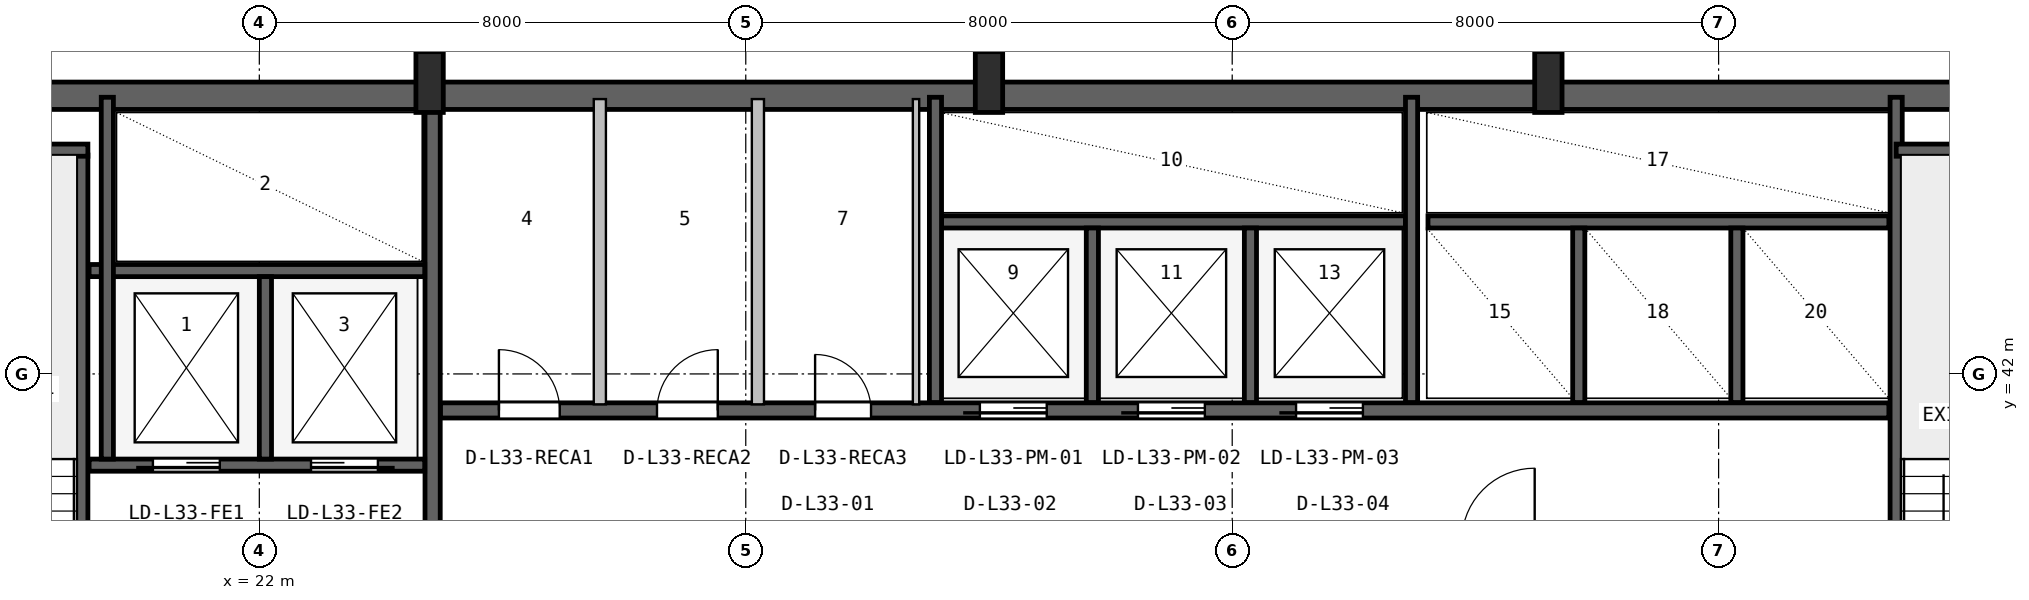
"""IFC4 building model, lengths in metres.
Left out: names, types, materials, properties, quantities, classifications, styles, units other than length and angle.
Written with IfcOpenShell. Run it as: python <this file> out.ifc"""

import sys

from ifc_helpers import new_model, si_unit, direction, frame, frame_2d, origin, origin_2d, place, context, subcontext, project, spatial, rectangle, i_section, extrude, source, transform, mapped, element, fill, save


model = new_model("IFC4")
c1 = context("Model", 3, precision=1e-05, world=origin(), true_north=direction((0.0, 1.0)))
c2 = subcontext(c1, "Body", "Model", "MODEL_VIEW")
j1 = project(units=[si_unit("LENGTHUNIT", "METRE"), si_unit("PLANEANGLEUNIT", "RADIAN")], contexts=[c1])
p1 = place(None, origin())
s1 = spatial("IfcSite", under=j1, at=p1, CompositionType="ELEMENT")
p2 = place(p1, origin())
s2 = spatial("IfcBuilding", under=s1, at=p2, CompositionType="ELEMENT")
p3 = place(p2, frame((0.0, 0.0, 137.2)))
s3 = spatial("IfcBuildingStorey", under=s2, at=p3, CompositionType="ELEMENT", Elevation=137.2)
p4 = place(p3, frame((15.6, 46.575, 0.0), z_axis=(0.0, 0.0, 1.0), x_axis=(1.0, 0.0, 0.0)))
e1 = element("IfcWall", 1, at=p4, inside=s3, PredefinedType="SHEAR", context=c2, shape_type="SweptSolid", body=[
    extrude(rectangle(XDim=36.8, YDim=0.45, at=frame_2d((18.4, 0.0))), origin(), (0.0, 0.0, 1.0), 3.48),
])
m1 = source(origin(), c2, "Body", "SweptSolid", [
    extrude(i_section(OverallWidth=0.45, OverallDepth=1.0, WebThickness=0.016, FlangeThickness=0.03, FilletRadius=0.016, at=origin_2d()), origin(), (0.0, 0.0, 1.0), 3.8),
])
for number, where, z_axis, x_axis in (
    (2, (24.8, 46.8, 0.0), (0.0, 0.0, 1.0), (1.0, 0.0, 0.0)),
    (3, (34.0, 46.8, 0.0), (0.0, 0.0, 1.0), (1.0, 0.0, 0.0)),
    (4, (43.2, 46.8, 0.0), (0.0, 0.0, 1.0), (1.0, 0.0, 0.0)),
):
    element("IfcColumn", number, at=place(p3, frame(where, z_axis=z_axis, x_axis=x_axis)), inside=s3, PredefinedType="COLUMN", context=c2, shape_type="MappedRepresentation", body=[
        mapped(m1, transform((0.0, 0.0, 0.0), x_axis=(1.0, 0.0, 0.0), y_axis=(0.0, 1.0, 0.0), z_axis=(0.0, 0.0, 1.0), scale=1.0)),
    ])
p5 = place(p3, frame((19.08, 35.95, 0.0), z_axis=(0.0, 0.0, 1.0), x_axis=(0.0, 1.0, 0.0)))
e5 = element("IfcWall", 5, at=p5, inside=s3, PredefinedType="SHEAR", context=c2, shape_type="SweptSolid", body=[
    extrude(rectangle(XDim=9.65, YDim=0.2, at=frame_2d((4.825, 0.0))), origin(), (0.0, 0.0, 1.0), 3.48),
])
p6 = place(p5, frame((0.25, 0.0, 0.0)))
e6 = element("IfcOpeningElement", 6, at=p6, cuts=e5, PredefinedType="OPENING", context=c2, shape_type="SweptSolid", body=[
    extrude(rectangle(XDim=0.95, YDim=2.1, at=frame_2d((0.475, 1.05))), frame((0.0, 0.11, 0.0), z_axis=(0.0, -1.0, 0.0), x_axis=(1.0, 0.0, 0.0)), (0.0, 0.0, 1.0), 0.22),
])
p7 = place(p3, frame((15.95, 45.68, 0.0), z_axis=(0.0, 0.0, 1.0), x_axis=(1.0, 0.0, 0.0)))
e7 = element("IfcWall", 7, at=p7, inside=s3, PredefinedType="SHEAR", context=c2, shape_type="SweptSolid", body=[
    extrude(rectangle(XDim=3.23, YDim=0.2, at=frame_2d((1.615, 0.0))), origin(), (0.0, 0.0, 1.0), 3.48),
])
p8 = place(p3, frame((24.85, 36.05, 0.0), z_axis=(0.0, 0.0, 1.0), x_axis=(0.0, 1.0, 0.0)))
e8 = element("IfcWall", 8, at=p8, inside=s3, PredefinedType="SHEAR", context=c2, shape_type="SweptSolid", body=[
    extrude(rectangle(XDim=10.45, YDim=0.25, at=frame_2d((5.225, 0.0))), origin(), (0.0, 0.0, 1.0), 3.48),
])
p9 = place(p3, frame((19.2, 40.5, 0.0), z_axis=(0.0, 0.0, 1.0), x_axis=(1.0, 0.0, 0.0)))
e9 = element("IfcWall", 9, at=p9, inside=s3, PredefinedType="SHEAR", context=c2, shape_type="SweptSolid", body=[
    extrude(rectangle(XDim=5.52, YDim=0.2, at=frame_2d((2.76, 0.0))), origin(), (0.0, 0.0, 1.0), 3.48),
])
p10 = place(p9, frame((1.05, 0.0, 0.0)))
e10 = element("IfcOpeningElement", 10, at=p10, cuts=e9, PredefinedType="OPENING", context=c2, shape_type="SweptSolid", body=[
    extrude(rectangle(XDim=1.1, YDim=2.18, at=frame_2d((0.55, 1.09))), frame((0.0, 0.11, 0.0), z_axis=(0.0, -1.0, 0.0), x_axis=(1.0, 0.0, 0.0)), (0.0, 0.0, 1.0), 0.22),
])
p11 = place(p9, frame((3.65, 0.0, 0.0)))
e11 = element("IfcOpeningElement", 11, at=p11, cuts=e9, PredefinedType="OPENING", context=c2, shape_type="SweptSolid", body=[
    extrude(rectangle(XDim=1.1, YDim=2.18, at=frame_2d((0.55, 1.09))), frame((0.0, 0.11, 0.0), z_axis=(0.0, -1.0, 0.0), x_axis=(1.0, 0.0, 0.0)), (0.0, 0.0, 1.0), 0.22),
])
p12 = place(p3, frame((19.2, 43.7, 0.0), z_axis=(0.0, 0.0, 1.0), x_axis=(1.0, 0.0, 0.0)))
e12 = element("IfcWall", 12, at=p12, inside=s3, PredefinedType="SHEAR", context=c2, shape_type="SweptSolid", body=[
    extrude(rectangle(XDim=5.52, YDim=0.2, at=frame_2d((2.76, 0.0))), origin(), (0.0, 0.0, 1.0), 3.48),
])
p13 = place(p3, frame((22.1, 40.6, 0.0), z_axis=(0.0, 0.0, 1.0), x_axis=(0.0, 1.0, 0.0)))
e13 = element("IfcWall", 13, at=p13, inside=s3, PredefinedType="SHEAR", context=c2, shape_type="SweptSolid", body=[
    extrude(rectangle(XDim=3.0, YDim=0.2, at=frame_2d((1.5, 0.0))), origin(), (0.0, 0.0, 1.0), 3.48),
])
p14 = place(p3, frame((19.5, 40.6, 0.0), z_axis=(0.0, 0.0, 1.0), x_axis=(0.0, 1.0, 0.0)))
e14 = element("IfcWall", 14, at=p14, inside=s3, PredefinedType="SHEAR", context=c2, shape_type="SweptSolid", body=[
    extrude(rectangle(XDim=5.95, YDim=0.2, at=frame_2d((2.975, 0.0))), origin(), (0.0, 0.0, 1.0), 3.48),
])
p15 = place(p3, frame((48.92, 36.05, 0.0), z_axis=(0.0, 0.0, 1.0), x_axis=(0.0, 1.0, 0.0)))
e15 = element("IfcWall", 15, at=p15, inside=s3, PredefinedType="SHEAR", context=c2, shape_type="SweptSolid", body=[
    extrude(rectangle(XDim=10.5, YDim=0.2, at=frame_2d((5.25, 0.0))), origin(), (0.0, 0.0, 1.0), 3.48),
])
p16 = place(p3, frame((48.92, 45.68, 0.0), z_axis=(0.0, 0.0, 1.0), x_axis=(1.0, 0.0, 0.0)))
e16 = element("IfcWall", 16, at=p16, inside=s3, PredefinedType="SHEAR", context=c2, shape_type="SweptSolid", body=[
    extrude(rectangle(XDim=3.18, YDim=0.2, at=frame_2d((1.59, 0.0))), origin(), (0.0, 0.0, 1.0), 3.48),
])
p17 = place(p3, frame((24.98, 41.4, 0.0), z_axis=(0.0, 0.0, 1.0), x_axis=(1.0, 0.0, 0.0)))
e17 = element("IfcWall", 17, at=p17, inside=s3, PredefinedType="SHEAR", context=c2, shape_type="SweptSolid", body=[
    extrude(rectangle(XDim=23.82, YDim=0.25, at=frame_2d((11.91, 0.0))), origin(), (0.0, 0.0, 1.0), 3.48),
])
p18 = place(p17, frame((8.87, 0.0, 0.0)))
e18 = element("IfcOpeningElement", 18, at=p18, cuts=e17, PredefinedType="OPENING", context=c2, shape_type="SweptSolid", body=[
    extrude(rectangle(XDim=1.1, YDim=2.18, at=frame_2d((0.55, 1.09))), frame((0.0, 0.135, 0.0), z_axis=(0.0, -1.0, 0.0), x_axis=(1.0, 0.0, 0.0)), (0.0, 0.0, 1.0), 0.27),
])
p19 = place(p17, frame((11.47, 0.0, 0.0)))
e19 = element("IfcOpeningElement", 19, at=p19, cuts=e17, PredefinedType="OPENING", context=c2, shape_type="SweptSolid", body=[
    extrude(rectangle(XDim=1.1, YDim=2.18, at=frame_2d((0.55, 1.09))), frame((0.0, 0.135, 0.0), z_axis=(0.0, -1.0, 0.0), x_axis=(1.0, 0.0, 0.0)), (0.0, 0.0, 1.0), 0.27),
])
p20 = place(p17, frame((14.07, 0.0, 0.0)))
e20 = element("IfcOpeningElement", 20, at=p20, cuts=e17, PredefinedType="OPENING", context=c2, shape_type="SweptSolid", body=[
    extrude(rectangle(XDim=1.1, YDim=2.18, at=frame_2d((0.55, 1.09))), frame((0.0, 0.135, 0.0), z_axis=(0.0, -1.0, 0.0), x_axis=(1.0, 0.0, 0.0)), (0.0, 0.0, 1.0), 0.27),
])
p21 = place(p17, frame((0.96, 0.0, 0.0)))
e21 = element("IfcOpeningElement", 21, at=p21, cuts=e17, PredefinedType="OPENING", context=c2, shape_type="SweptSolid", body=[
    extrude(rectangle(XDim=1.0, YDim=2.08, at=frame_2d((0.5, 1.04))), frame((0.0, 0.135, 0.0), z_axis=(0.0, -1.0, 0.0), x_axis=(1.0, 0.0, 0.0)), (0.0, 0.0, 1.0), 0.27),
])
p22 = place(p17, frame((3.56, 0.0, 0.0)))
e22 = element("IfcOpeningElement", 22, at=p22, cuts=e17, PredefinedType="OPENING", context=c2, shape_type="SweptSolid", body=[
    extrude(rectangle(XDim=1.0, YDim=2.08, at=frame_2d((0.5, 1.04))), frame((0.0, 0.135, 0.0), z_axis=(0.0, -1.0, 0.0), x_axis=(1.0, 0.0, 0.0)), (0.0, 0.0, 1.0), 0.27),
])
p23 = place(p17, frame((6.16, 0.0, 0.0)))
e23 = element("IfcOpeningElement", 23, at=p23, cuts=e17, PredefinedType="OPENING", context=c2, shape_type="SweptSolid", body=[
    extrude(rectangle(XDim=0.92, YDim=2.08, at=frame_2d((0.46, 1.04))), frame((0.0, 0.135, 0.0), z_axis=(0.0, -1.0, 0.0), x_axis=(1.0, 0.0, 0.0)), (0.0, 0.0, 1.0), 0.27),
])
p24 = place(p3, frame((33.22, 44.5, 0.0), z_axis=(0.0, 0.0, 1.0), x_axis=(1.0, 0.0, 0.0)))
e24 = element("IfcWall", 24, at=p24, inside=s3, PredefinedType="SHEAR", context=c2, shape_type="SweptSolid", body=[
    extrude(rectangle(XDim=7.63, YDim=0.2, at=frame_2d((3.815, 0.0))), origin(), (0.0, 0.0, 1.0), 3.48),
])
p25 = place(p3, frame((33.12, 41.53, 0.0), z_axis=(0.0, 0.0, 1.0), x_axis=(0.0, 1.0, 0.0)))
e25 = element("IfcWall", 25, at=p25, inside=s3, PredefinedType="SHEAR", context=c2, shape_type="SweptSolid", body=[
    extrude(rectangle(XDim=5.02, YDim=0.2, at=frame_2d((2.51, 0.0))), origin(), (0.0, 0.0, 1.0), 3.48),
])
for number, where, z_axis, x_axis in (
    (26, (35.7, 41.53, 0.0), (0.0, 0.0, 1.0), (0.0, 1.0, 0.0)),
    (27, (38.3, 41.53, 0.0), (0.0, 0.0, 1.0), (0.0, 1.0, 0.0)),
):
    element("IfcWall", number, at=place(p3, frame(where, z_axis=z_axis, x_axis=x_axis)), inside=s3, PredefinedType="SHEAR", context=c2, shape_type="SweptSolid", body=[
        extrude(rectangle(XDim=2.87, YDim=0.2, at=frame_2d((1.435, 0.0))), origin(), (0.0, 0.0, 1.0), 3.48),
    ])
p26 = place(p3, frame((40.95, 41.53, 0.0), z_axis=(0.0, 0.0, 1.0), x_axis=(0.0, 1.0, 0.0)))
e28 = element("IfcWall", 28, at=p26, inside=s3, PredefinedType="SHEAR", context=c2, shape_type="SweptSolid", body=[
    extrude(rectangle(XDim=5.02, YDim=0.2, at=frame_2d((2.51, 0.0))), origin(), (0.0, 0.0, 1.0), 3.48),
])
p27 = place(p3, frame((41.22, 44.5, 0.0), z_axis=(0.0, 0.0, 1.0), x_axis=(1.0, 0.0, 0.0)))
e29 = element("IfcWall", 29, at=p27, inside=s3, PredefinedType="SHEAR", context=c2, shape_type="SweptSolid", body=[
    extrude(rectangle(XDim=7.58, YDim=0.2, at=frame_2d((3.79, 0.0))), origin(), (0.0, 0.0, 1.0), 3.48),
])
for number, where, z_axis, x_axis in (
    (30, (43.7, 41.53, 0.0), (0.0, 0.0, 1.0), (0.0, 1.0, 0.0)),
    (31, (46.3, 41.53, 0.0), (0.0, 0.0, 1.0), (0.0, 1.0, 0.0)),
):
    element("IfcWall", number, at=place(p3, frame(where, z_axis=z_axis, x_axis=x_axis)), inside=s3, PredefinedType="SHEAR", context=c2, shape_type="SweptSolid", body=[
        extrude(rectangle(XDim=2.87, YDim=0.2, at=frame_2d((1.435, 0.0))), origin(), (0.0, 0.0, 1.0), 3.48),
    ])
for number, where, z_axis, x_axis in (
    (32, (27.6, 41.5, 0.0), (0.0, 0.0, 1.0), (0.0, 1.0, 0.0)),
    (33, (30.2, 41.5, 0.0), (0.0, 0.0, 1.0), (0.0, 1.0, 0.0)),
):
    element("IfcWall", number, at=place(p3, frame(where, z_axis=z_axis, x_axis=x_axis)), inside=s3, PredefinedType="SOLIDWALL", context=c2, shape_type="SweptSolid", body=[
        extrude(rectangle(XDim=5.02, YDim=0.2, at=frame_2d((2.51, 0.0))), origin(), (0.0, 0.0, 1.0), 3.46),
    ])
p28 = place(p3, frame((32.8, 41.5, 0.0), z_axis=(0.0, 0.0, 1.0), x_axis=(0.0, 1.0, 0.0)))
e34 = element("IfcWall", 34, at=p28, inside=s3, PredefinedType="PARTITIONING", context=c2, shape_type="SweptSolid", body=[
    extrude(rectangle(XDim=5.02, YDim=0.105, at=frame_2d((2.51, 0.0))), origin(), (0.0, 0.0, 1.0), 3.46),
])
m2 = source(origin(), c2, "Body", "SweptSolid", [
    extrude(rectangle(XDim=1.1, YDim=2.18, at=frame_2d((0.55, 1.09))), frame((0.0, 0.025, 0.0), z_axis=(0.0, -1.0, 0.0), x_axis=(1.0, 0.0, 0.0)), (0.0, 0.0, 1.0), 0.05),
])
p29 = place(p10, frame((1.1, 0.0, 0.0), z_axis=(0.0, 0.0, 1.0), x_axis=(-1.0, 0.0, 0.0)))
e35 = element("IfcDoor", 35, at=p29, inside=s3, OperationType="SLIDING_TO_LEFT", PredefinedType="DOOR", context=c2, shape_type="MappedRepresentation", body=[
    mapped(m2, transform((0.0, 0.0, 0.0), x_axis=(1.0, 0.0, 0.0), y_axis=(0.0, 1.0, 0.0), z_axis=(0.0, 0.0, 1.0), scale=1.0)),
])
fill(e10, e35)
p30 = place(p11, frame((1.1, 0.0, 0.0), z_axis=(0.0, 0.0, 1.0), x_axis=(-1.0, 0.0, 0.0)))
e36 = element("IfcDoor", 36, at=p30, inside=s3, OperationType="SLIDING_TO_RIGHT", PredefinedType="DOOR", context=c2, shape_type="MappedRepresentation", body=[
    mapped(m2, transform((0.0, 0.0, 0.0), x_axis=(1.0, 0.0, 0.0), y_axis=(0.0, 1.0, 0.0), z_axis=(0.0, 0.0, 1.0), scale=1.0)),
])
fill(e11, e36)
p31 = place(p18, frame((1.1, 0.0, 0.0), z_axis=(0.0, 0.0, 1.0), x_axis=(-1.0, 0.0, 0.0)))
e37 = element("IfcDoor", 37, at=p31, inside=s3, OperationType="SLIDING_TO_LEFT", PredefinedType="DOOR", context=c2, shape_type="MappedRepresentation", body=[
    mapped(m2, transform((0.0, 0.0, 0.0), x_axis=(1.0, 0.0, 0.0), y_axis=(0.0, 1.0, 0.0), z_axis=(0.0, 0.0, 1.0), scale=1.0)),
])
fill(e18, e37)
p32 = place(p19, frame((1.1, 0.0, 0.0), z_axis=(0.0, 0.0, 1.0), x_axis=(-1.0, 0.0, 0.0)))
e38 = element("IfcDoor", 38, at=p32, inside=s3, OperationType="SLIDING_TO_LEFT", PredefinedType="DOOR", context=c2, shape_type="MappedRepresentation", body=[
    mapped(m2, transform((0.0, 0.0, 0.0), x_axis=(1.0, 0.0, 0.0), y_axis=(0.0, 1.0, 0.0), z_axis=(0.0, 0.0, 1.0), scale=1.0)),
])
fill(e19, e38)
p33 = place(p20, frame((1.1, 0.0, 0.0), z_axis=(0.0, 0.0, 1.0), x_axis=(-1.0, 0.0, 0.0)))
e39 = element("IfcDoor", 39, at=p33, inside=s3, OperationType="SLIDING_TO_LEFT", PredefinedType="DOOR", context=c2, shape_type="MappedRepresentation", body=[
    mapped(m2, transform((0.0, 0.0, 0.0), x_axis=(1.0, 0.0, 0.0), y_axis=(0.0, 1.0, 0.0), z_axis=(0.0, 0.0, 1.0), scale=1.0)),
])
fill(e20, e39)
m3 = source(origin(), c2, "Body", "SweptSolid", [
    extrude(rectangle(XDim=1.0, YDim=2.08, at=frame_2d((0.5, 1.04))), frame((0.0, 0.025, 0.0), z_axis=(0.0, -1.0, 0.0), x_axis=(1.0, 0.0, 0.0)), (0.0, 0.0, 1.0), 0.05),
])
p34 = place(p21, origin())
e40 = element("IfcDoor", 40, at=p34, inside=s3, OperationType="SINGLE_SWING_LEFT", PredefinedType="DOOR", context=c2, shape_type="MappedRepresentation", body=[
    mapped(m3, transform((0.0, 0.0, 0.0), x_axis=(1.0, 0.0, 0.0), y_axis=(0.0, 1.0, 0.0), z_axis=(0.0, 0.0, 1.0), scale=1.0)),
])
fill(e21, e40)
p35 = place(p22, origin())
e41 = element("IfcDoor", 41, at=p35, inside=s3, OperationType="SINGLE_SWING_RIGHT", PredefinedType="DOOR", context=c2, shape_type="MappedRepresentation", body=[
    mapped(m3, transform((0.0, 0.0, 0.0), x_axis=(1.0, 0.0, 0.0), y_axis=(0.0, 1.0, 0.0), z_axis=(0.0, 0.0, 1.0), scale=1.0)),
])
fill(e22, e41)
m4 = source(origin(), c2, "Body", "SweptSolid", [
    extrude(rectangle(XDim=0.92, YDim=2.08, at=frame_2d((0.46, 1.04))), frame((0.0, 0.025, 0.0), z_axis=(0.0, -1.0, 0.0), x_axis=(1.0, 0.0, 0.0)), (0.0, 0.0, 1.0), 0.05),
])
p36 = place(p23, origin())
e42 = element("IfcDoor", 42, at=p36, inside=s3, OperationType="SINGLE_SWING_LEFT", PredefinedType="DOOR", context=c2, shape_type="MappedRepresentation", body=[
    mapped(m4, transform((0.0, 0.0, 0.0), x_axis=(1.0, 0.0, 0.0), y_axis=(0.0, 1.0, 0.0), z_axis=(0.0, 0.0, 1.0), scale=1.0)),
])
fill(e23, e42)
save(model, sys.argv[1])
